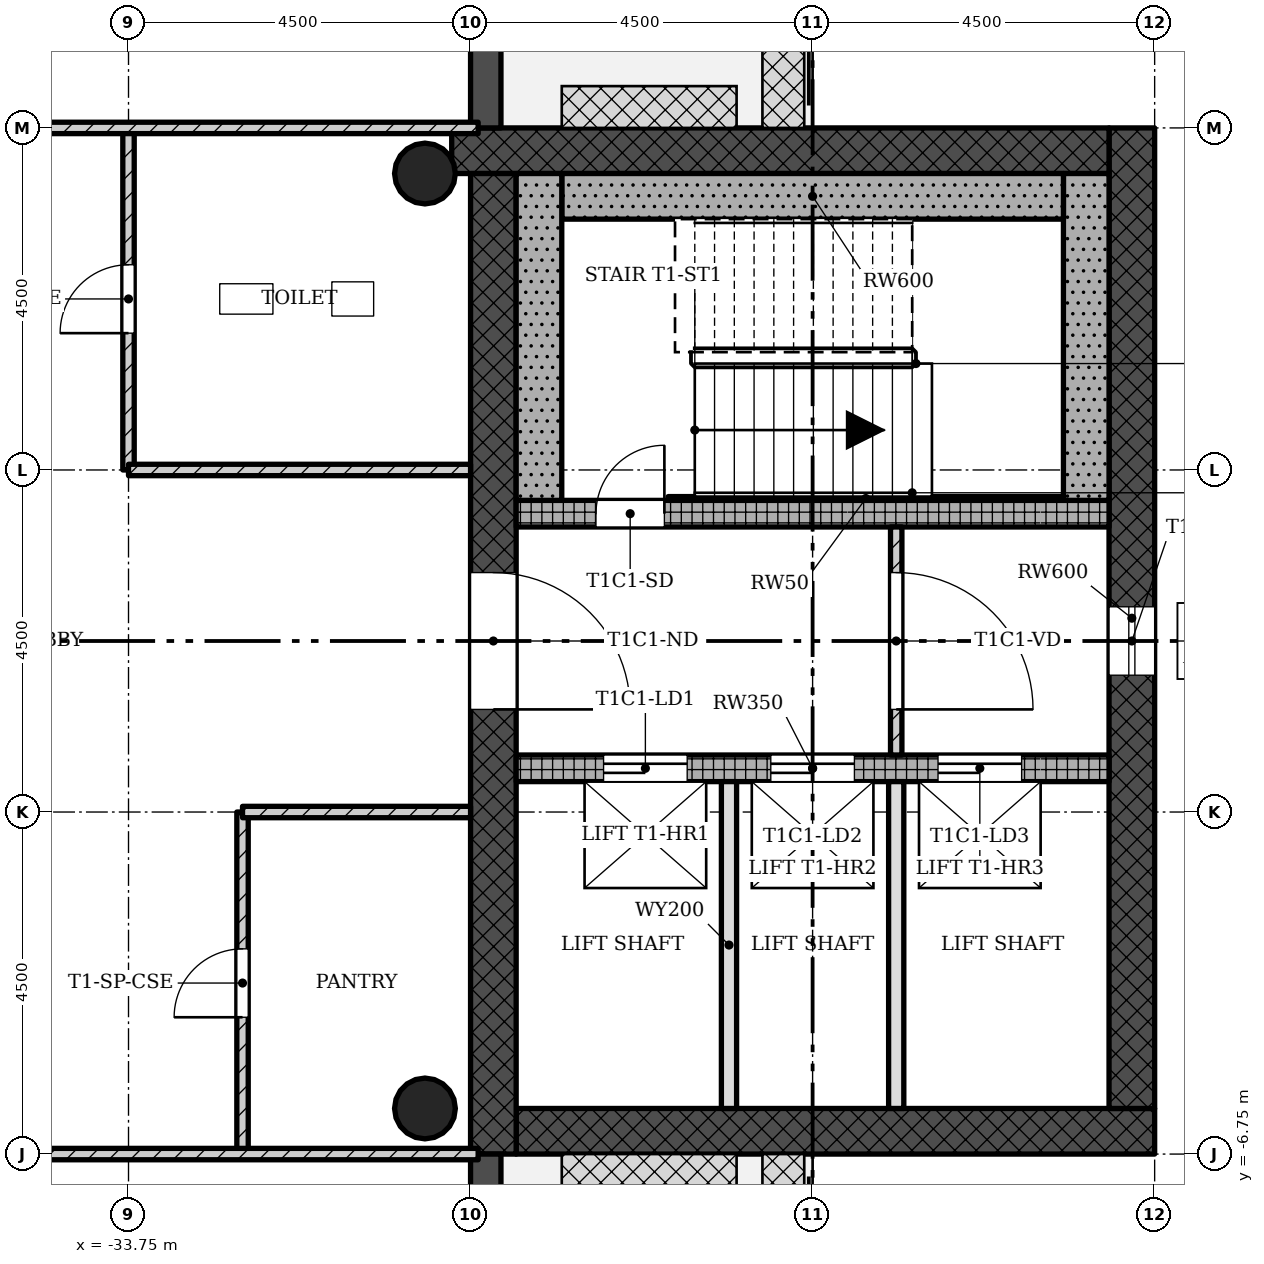
"""IFC4 building model, lengths in metres.
Left out: names, types, materials, properties, quantities, classifications, styles, units other than length and angle.
Written with IfcOpenShell. Run it as: python <this file> out.ifc"""

import sys

from ifc_helpers import new_model, si_unit, direction, frame, frame_2d, origin, origin_2d, place, context, subcontext, project, spatial, rectangle, hollow_circle, extrude, element, fill, save


model = new_model("IFC4")
c1 = context("Model", 3, precision=1e-05, world=origin(), true_north=direction((0.0, 1.0)))
c2 = subcontext(c1, "Body", "Model", "MODEL_VIEW")
j1 = project(units=[si_unit("LENGTHUNIT", "METRE"), si_unit("PLANEANGLEUNIT", "RADIAN")], contexts=[c1])
p1 = place(None, origin())
s1 = spatial("IfcSite", under=j1, at=p1, CompositionType="ELEMENT")
p2 = place(p1, origin())
s2 = spatial("IfcBuilding", under=s1, at=p2, CompositionType="ELEMENT")
p3 = place(p2, frame((0.0, 0.0, 237.9)))
s3 = spatial("IfcBuildingStorey", under=s2, at=p3, CompositionType="ELEMENT", Elevation=237.9)
p4 = place(p3, frame((-28.65, -6.45, 0.0), z_axis=(0.0, 0.0, 1.0), x_axis=(1.0, 0.0, 0.0)))
e1 = element("IfcWall", 1, at=p4, inside=s3, PredefinedType="SHEAR", context=c2, shape_type="SweptSolid", body=[
    extrude(rectangle(XDim=8.4, YDim=0.6, at=frame_2d((4.2, 0.0))), origin(), (0.0, 0.0, 1.0), 4.5),
])
p5 = place(p3, frame((-20.55, -6.15, 0.0), z_axis=(0.0, 0.0, 1.0), x_axis=(0.0, 1.0, 0.0)))
e2 = element("IfcWall", 2, at=p5, inside=s3, PredefinedType="SHEAR", context=c2, shape_type="SweptSolid", body=[
    extrude(rectangle(XDim=12.9, YDim=0.6, at=frame_2d((6.45, 0.0))), origin(), (0.0, 0.0, 1.0), 4.5),
])
p6 = place(p5, frame((5.7, 0.0, 0.45)))
e3 = element("IfcOpeningElement", 3, at=p6, cuts=e2, PredefinedType="OPENING", context=c2, shape_type="SweptSolid", body=[
    extrude(rectangle(XDim=0.9, YDim=2.4, at=frame_2d((0.45, 1.2))), frame((0.0, 0.31, 0.0), z_axis=(0.0, -1.0, 0.0), x_axis=(1.0, 0.0, 0.0)), (0.0, 0.0, 1.0), 0.62),
])
p7 = place(p3, frame((-20.85, 6.45, 0.0), z_axis=(0.0, 0.0, 1.0), x_axis=(-1.0, 0.0, 0.0)))
e4 = element("IfcWall", 4, at=p7, inside=s3, PredefinedType="SHEAR", context=c2, shape_type="SweptSolid", body=[
    extrude(rectangle(XDim=8.648, YDim=0.6, at=frame_2d((4.324, 0.0))), origin(), (0.0, 0.0, 1.0), 4.5),
])
p8 = place(p3, frame((-28.95, 6.15, 0.0), z_axis=(0.0, 0.0, 1.0), x_axis=(0.0, -1.0, 0.0)))
e5 = element("IfcWall", 5, at=p8, inside=s3, PredefinedType="SHEAR", context=c2, shape_type="SweptSolid", body=[
    extrude(rectangle(XDim=12.9, YDim=0.6, at=frame_2d((6.45, 0.0))), origin(), (0.0, 0.0, 1.0), 4.5),
])
p9 = place(p8, frame((5.25, 0.0, 0.0)))
e6 = element("IfcOpeningElement", 6, at=p9, cuts=e5, PredefinedType="OPENING", context=c2, shape_type="SweptSolid", body=[
    extrude(rectangle(XDim=1.8, YDim=2.1, at=frame_2d((0.9, 1.05))), frame((0.0, 0.31, 0.0), z_axis=(0.0, -1.0, 0.0), x_axis=(1.0, 0.0, 0.0)), (0.0, 0.0, 1.0), 0.62),
])
p10 = place(p3, frame((-28.65, -1.675, 0.0), z_axis=(0.0, 0.0, 1.0), x_axis=(1.0, 0.0, 0.0)))
e7 = element("IfcWall", 7, at=p10, inside=s3, PredefinedType="SHEAR", context=c2, shape_type="SweptSolid", body=[
    extrude(rectangle(XDim=7.8, YDim=0.35, at=frame_2d((3.9, 0.0))), origin(), (0.0, 0.0, 1.0), 4.5),
])
p11 = place(p10, frame((1.15, 0.0, 0.0)))
e8 = element("IfcOpeningElement", 8, at=p11, cuts=e7, PredefinedType="OPENING", context=c2, shape_type="SweptSolid", body=[
    extrude(rectangle(XDim=1.1, YDim=2.1, at=frame_2d((0.55, 1.05))), frame((0.0, 0.185, 0.0), z_axis=(0.0, -1.0, 0.0), x_axis=(1.0, 0.0, 0.0)), (0.0, 0.0, 1.0), 0.37),
])
p12 = place(p10, frame((3.35, 0.0, 0.0)))
e9 = element("IfcOpeningElement", 9, at=p12, cuts=e7, PredefinedType="OPENING", context=c2, shape_type="SweptSolid", body=[
    extrude(rectangle(XDim=1.1, YDim=2.1, at=frame_2d((0.55, 1.05))), frame((0.0, 0.185, 0.0), z_axis=(0.0, -1.0, 0.0), x_axis=(1.0, 0.0, 0.0)), (0.0, 0.0, 1.0), 0.37),
])
p13 = place(p10, frame((5.55, 0.0, 0.0)))
e10 = element("IfcOpeningElement", 10, at=p13, cuts=e7, PredefinedType="OPENING", context=c2, shape_type="SweptSolid", body=[
    extrude(rectangle(XDim=1.1, YDim=2.1, at=frame_2d((0.55, 1.05))), frame((0.0, 0.185, 0.0), z_axis=(0.0, -1.0, 0.0), x_axis=(1.0, 0.0, 0.0)), (0.0, 0.0, 1.0), 0.37),
])
p14 = place(p3, frame((-28.65, 1.675, 0.0), z_axis=(0.0, 0.0, 1.0), x_axis=(1.0, 0.0, 0.0)))
e11 = element("IfcWall", 11, at=p14, inside=s3, PredefinedType="SHEAR", context=c2, shape_type="SweptSolid", body=[
    extrude(rectangle(XDim=7.8, YDim=0.35, at=frame_2d((3.9, 0.0))), origin(), (0.0, 0.0, 1.0), 4.5),
])
p15 = place(p14, frame((1.05, 0.0, 0.0)))
e12 = element("IfcOpeningElement", 12, at=p15, cuts=e11, PredefinedType="OPENING", context=c2, shape_type="SweptSolid", body=[
    extrude(rectangle(XDim=0.9, YDim=2.1, at=frame_2d((0.45, 1.05))), frame((0.0, 0.185, 0.0), z_axis=(0.0, -1.0, 0.0), x_axis=(1.0, 0.0, 0.0)), (0.0, 0.0, 1.0), 0.37),
])
for number, where, z_axis, x_axis in (
    (13, (-29.85, -6.15, 0.0), (0.0, 0.0, 1.0), (1.0, 0.0, 0.0)),
    (14, (-29.85, 6.15, 0.0), (0.0, 0.0, 1.0), (1.0, 0.0, 0.0)),
):
    element("IfcColumn", number, at=place(p3, frame(where, z_axis=z_axis, x_axis=x_axis)), inside=s3, PredefinedType="COLUMN", context=c2, shape_type="SweptSolid", body=[
        extrude(hollow_circle(Radius=0.4, WallThickness=0.028, at=origin_2d()), origin(), (0.0, 0.0, 1.0), 4.5),
    ])
p16 = place(p3, frame((-29.05, -11.25, -0.02), z_axis=(0.0, 0.0, 1.0), x_axis=(0.0, 1.0, 0.0)))
e15 = element("IfcWall", 15, at=p16, inside=s3, PredefinedType="STANDARD", context=c2, shape_type="SweptSolid", body=[
    extrude(rectangle(XDim=4.5, YDim=0.4, at=frame_2d((2.25, 0.0))), origin(), (0.0, 0.0, 1.0), 4.22),
])
p17 = place(p16, frame((1.35, 0.0, 0.02)))
e16 = element("IfcOpeningElement", 16, at=p17, cuts=e15, PredefinedType="OPENING", context=c2, shape_type="SweptSolid", body=[
    extrude(rectangle(XDim=1.8, YDim=2.1, at=frame_2d((0.9, 1.05))), frame((0.0, 0.21, 0.0), z_axis=(0.0, -1.0, 0.0), x_axis=(1.0, 0.0, 0.0)), (0.0, 0.0, 1.0), 0.42),
])
p18 = place(p3, frame((-29.05, 6.75, -0.02), z_axis=(0.0, 0.0, 1.0), x_axis=(0.0, 1.0, 0.0)))
e17 = element("IfcWall", 17, at=p18, inside=s3, PredefinedType="STANDARD", context=c2, shape_type="SweptSolid", body=[
    extrude(rectangle(XDim=4.5, YDim=0.4, at=frame_2d((2.25, 0.0))), origin(), (0.0, 0.0, 1.0), 4.22),
])
p19 = place(p18, frame((1.35, 0.0, 0.02)))
e18 = element("IfcOpeningElement", 18, at=p19, cuts=e17, PredefinedType="OPENING", context=c2, shape_type="SweptSolid", body=[
    extrude(rectangle(XDim=1.8, YDim=2.1, at=frame_2d((0.9, 1.05))), frame((0.0, 0.21, 0.0), z_axis=(0.0, -1.0, 0.0), x_axis=(1.0, 0.0, 0.0)), (0.0, 0.0, 1.0), 0.42),
])
p20 = place(p3, frame((-23.65, -1.5, 0.0), z_axis=(0.0, 0.0, 1.0), x_axis=(0.0, 1.0, 0.0)))
e19 = element("IfcWall", 19, at=p20, inside=s3, PredefinedType="PARTITIONING", context=c2, shape_type="SweptSolid", body=[
    extrude(rectangle(XDim=3.0, YDim=0.15, at=frame_2d((1.5, 0.0))), origin(), (0.0, 0.0, 1.0), 4.1),
])
p21 = place(p20, frame((0.6, 0.0, 0.0)))
e20 = element("IfcOpeningElement", 20, at=p21, cuts=e19, PredefinedType="OPENING", context=c2, shape_type="SweptSolid", body=[
    extrude(rectangle(XDim=1.8, YDim=2.1, at=frame_2d((0.9, 1.05))), frame((0.0, 0.085, 0.0), z_axis=(0.0, -1.0, 0.0), x_axis=(1.0, 0.0, 0.0)), (0.0, 0.0, 1.0), 0.17),
])
for number, where, z_axis, x_axis in (
    (21, (-25.85, -6.15, 0.0), (0.0, 0.0, 1.0), (0.0, 1.0, 0.0)),
    (22, (-23.65, -6.15, 0.0), (0.0, 0.0, 1.0), (0.0, 1.0, 0.0)),
):
    element("IfcWall", number, at=place(p3, frame(where, z_axis=z_axis, x_axis=x_axis)), inside=s3, PredefinedType="SOLIDWALL", context=c2, shape_type="SweptSolid", body=[
        extrude(rectangle(XDim=4.3, YDim=0.2, at=frame_2d((2.15, 0.0))), origin(), (0.0, 0.0, 1.0), 4.1),
    ])
p22 = place(p3, frame((-33.75, 2.25, 0.0), z_axis=(0.0, 0.0, 1.0), x_axis=(0.0, 1.0, 0.0)))
e23 = element("IfcWall", 23, at=p22, inside=s3, PredefinedType="PARTITIONING", context=c2, shape_type="SweptSolid", body=[
    extrude(rectangle(XDim=4.5, YDim=0.15, at=frame_2d((2.25, 0.0))), origin(), (0.0, 0.0, 1.0), 4.1),
])
p23 = place(p22, frame((1.8, 0.0, 0.0)))
e24 = element("IfcOpeningElement", 24, at=p23, cuts=e23, PredefinedType="OPENING", context=c2, shape_type="SweptSolid", body=[
    extrude(rectangle(XDim=0.9, YDim=2.1, at=frame_2d((0.45, 1.05))), frame((0.0, 0.085, 0.0), z_axis=(0.0, -1.0, 0.0), x_axis=(1.0, 0.0, 0.0)), (0.0, 0.0, 1.0), 0.17),
])
p24 = place(p3, frame((-33.75, 2.25, 0.0), z_axis=(0.0, 0.0, 1.0), x_axis=(1.0, 0.0, 0.0)))
e25 = element("IfcWall", 25, at=p24, inside=s3, PredefinedType="PARTITIONING", context=c2, shape_type="SweptSolid", body=[
    extrude(rectangle(XDim=4.5, YDim=0.15, at=frame_2d((2.25, 0.0))), origin(), (0.0, 0.0, 1.0), 4.1),
])
p25 = place(p3, frame((-32.25, -6.75, 0.0), z_axis=(0.0, 0.0, 1.0), x_axis=(0.0, 1.0, 0.0)))
e26 = element("IfcWall", 26, at=p25, inside=s3, PredefinedType="PARTITIONING", context=c2, shape_type="SweptSolid", body=[
    extrude(rectangle(XDim=4.5, YDim=0.15, at=frame_2d((2.25, 0.0))), origin(), (0.0, 0.0, 1.0), 4.1),
])
p26 = place(p25, frame((1.8, 0.0, 0.0)))
e27 = element("IfcOpeningElement", 27, at=p26, cuts=e26, PredefinedType="OPENING", context=c2, shape_type="SweptSolid", body=[
    extrude(rectangle(XDim=0.9, YDim=2.1, at=frame_2d((0.45, 1.05))), frame((0.0, 0.085, 0.0), z_axis=(0.0, -1.0, 0.0), x_axis=(1.0, 0.0, 0.0)), (0.0, 0.0, 1.0), 0.17),
])
p27 = place(p3, frame((-32.25, -2.25, 0.0), z_axis=(0.0, 0.0, 1.0), x_axis=(1.0, 0.0, 0.0)))
e28 = element("IfcWall", 28, at=p27, inside=s3, PredefinedType="PARTITIONING", context=c2, shape_type="SweptSolid", body=[
    extrude(rectangle(XDim=3.0, YDim=0.15, at=frame_2d((1.5, 0.0))), origin(), (0.0, 0.0, 1.0), 4.1),
])
p28 = place(p3, frame((-42.85, 6.75, 0.0), z_axis=(0.0, 0.0, 1.0), x_axis=(1.0, 0.0, 0.0)))
e29 = element("IfcWall", 29, at=p28, inside=s3, PredefinedType="PARTITIONING", context=c2, shape_type="SweptSolid", body=[
    extrude(rectangle(XDim=13.7, YDim=0.15, at=frame_2d((6.85, 0.0))), origin(), (0.0, 0.0, 1.0), 4.1),
])
p29 = place(p28, frame((5.95, 0.0, 0.0)))
e30 = element("IfcOpeningElement", 30, at=p29, cuts=e29, PredefinedType="OPENING", context=c2, shape_type="SweptSolid", body=[
    extrude(rectangle(XDim=1.8, YDim=2.1, at=frame_2d((0.9, 1.05))), frame((0.0, 0.085, 0.0), z_axis=(0.0, -1.0, 0.0), x_axis=(1.0, 0.0, 0.0)), (0.0, 0.0, 1.0), 0.17),
])
p30 = place(p3, frame((-42.85, -6.75, 0.0), z_axis=(0.0, 0.0, 1.0), x_axis=(1.0, 0.0, 0.0)))
e31 = element("IfcWall", 31, at=p30, inside=s3, PredefinedType="PARTITIONING", context=c2, shape_type="SweptSolid", body=[
    extrude(rectangle(XDim=13.7, YDim=0.15, at=frame_2d((6.85, 0.0))), origin(), (0.0, 0.0, 1.0), 4.1),
])
p31 = place(p30, frame((5.95, 0.0, 0.0)))
e32 = element("IfcOpeningElement", 32, at=p31, cuts=e31, PredefinedType="OPENING", context=c2, shape_type="SweptSolid", body=[
    extrude(rectangle(XDim=1.8, YDim=2.1, at=frame_2d((0.9, 1.05))), frame((0.0, 0.085, 0.0), z_axis=(0.0, -1.0, 0.0), x_axis=(1.0, 0.0, 0.0)), (0.0, 0.0, 1.0), 0.17),
])
p32 = place(p3, frame((-21.15, 1.85, 0.0), z_axis=(0.0, 0.0, 1.0), x_axis=(0.0, 1.0, 0.0)))
e33 = element("IfcWall", 33, at=p32, inside=s3, PredefinedType="SHEAR", context=c2, shape_type="SweptSolid", body=[
    extrude(rectangle(XDim=4.3, YDim=0.6, at=frame_2d((2.15, 0.0))), origin(), (0.0, 0.0, 1.0), 4.5),
])
p33 = place(p3, frame((-28.05, 5.85, 0.0), z_axis=(0.0, 0.0, 1.0), x_axis=(1.0, 0.0, 0.0)))
e34 = element("IfcWall", 34, at=p33, inside=s3, PredefinedType="SHEAR", context=c2, shape_type="SweptSolid", body=[
    extrude(rectangle(XDim=6.6, YDim=0.6, at=frame_2d((3.3, 0.0))), origin(), (0.0, 0.0, 1.0), 4.5),
])
p34 = place(p3, frame((-28.35, 1.85, 0.0), z_axis=(0.0, 0.0, 1.0), x_axis=(0.0, 1.0, 0.0)))
e35 = element("IfcWall", 35, at=p34, inside=s3, PredefinedType="SHEAR", context=c2, shape_type="SweptSolid", body=[
    extrude(rectangle(XDim=4.3, YDim=0.6, at=frame_2d((2.15, 0.0))), origin(), (0.0, 0.0, 1.0), 4.5),
])
p35 = place(p3, frame((-26.65, 1.875, 0.0), z_axis=(0.0, 0.0, 1.0), x_axis=(1.0, 0.0, 0.0)))
e36 = element("IfcWall", 36, at=p35, inside=s3, PredefinedType="SHEAR", context=c2, shape_type="SweptSolid", body=[
    extrude(rectangle(XDim=5.2, YDim=0.05, at=frame_2d((2.6, 0.0))), origin(), (0.0, 0.0, 1.0), 4.5),
])
p36 = place(p6, origin())
e37 = element("IfcWindow", 37, at=p36, inside=s3, PartitioningType="SINGLE_PANEL", PredefinedType="WINDOW", context=c2, shape_type="SweptSolid", body=[
    extrude(rectangle(XDim=0.9, YDim=2.4, at=frame_2d((0.45, 1.2))), frame((0.0, 0.03, 0.0), z_axis=(0.0, -1.0, 0.0), x_axis=(1.0, 0.0, 0.0)), (0.0, 0.0, 1.0), 0.06),
])
fill(e3, e37)
p37 = place(p21, origin())
e38 = element("IfcDoor", 38, at=p37, inside=s3, OperationType="SINGLE_SWING_LEFT", PredefinedType="DOOR", context=c2, shape_type="SweptSolid", body=[
    extrude(rectangle(XDim=1.8, YDim=2.1, at=frame_2d((0.9, 1.05))), frame((0.0, 0.025, 0.0), z_axis=(0.0, -1.0, 0.0), x_axis=(1.0, 0.0, 0.0)), (0.0, 0.0, 1.0), 0.05),
])
fill(e20, e38)
p38 = place(p23, origin())
e39 = element("IfcDoor", 39, at=p38, inside=s3, OperationType="SINGLE_SWING_RIGHT", PredefinedType="DOOR", context=c2, shape_type="SweptSolid", body=[
    extrude(rectangle(XDim=0.9, YDim=2.1, at=frame_2d((0.45, 1.05))), frame((0.0, 0.025, 0.0), z_axis=(0.0, -1.0, 0.0), x_axis=(1.0, 0.0, 0.0)), (0.0, 0.0, 1.0), 0.05),
])
fill(e24, e39)
p39 = place(p26, origin())
e40 = element("IfcDoor", 40, at=p39, inside=s3, OperationType="SINGLE_SWING_RIGHT", PredefinedType="DOOR", context=c2, shape_type="SweptSolid", body=[
    extrude(rectangle(XDim=0.9, YDim=2.1, at=frame_2d((0.45, 1.05))), frame((0.0, 0.025, 0.0), z_axis=(0.0, -1.0, 0.0), x_axis=(1.0, 0.0, 0.0)), (0.0, 0.0, 1.0), 0.05),
])
fill(e27, e40)
p40 = place(p15, origin())
e41 = element("IfcDoor", 41, at=p40, inside=s3, OperationType="SINGLE_SWING_LEFT", PredefinedType="DOOR", context=c2, shape_type="SweptSolid", body=[
    extrude(rectangle(XDim=0.9, YDim=2.1, at=frame_2d((0.45, 1.05))), frame((0.0, 0.025, 0.0), z_axis=(0.0, -1.0, 0.0), x_axis=(1.0, 0.0, 0.0)), (0.0, 0.0, 1.0), 0.05),
])
fill(e12, e41)
p41 = place(p11, origin())
e42 = element("IfcDoor", 42, at=p41, inside=s3, OperationType="SLIDING_TO_LEFT", PredefinedType="DOOR", context=c2, shape_type="SweptSolid", body=[
    extrude(rectangle(XDim=1.1, YDim=2.1, at=frame_2d((0.55, 1.05))), frame((0.0, 0.025, 0.0), z_axis=(0.0, -1.0, 0.0), x_axis=(1.0, 0.0, 0.0)), (0.0, 0.0, 1.0), 0.05),
])
fill(e8, e42)
p42 = place(p12, origin())
e43 = element("IfcDoor", 43, at=p42, inside=s3, OperationType="SLIDING_TO_LEFT", PredefinedType="DOOR", context=c2, shape_type="SweptSolid", body=[
    extrude(rectangle(XDim=1.1, YDim=2.1, at=frame_2d((0.55, 1.05))), frame((0.0, 0.025, 0.0), z_axis=(0.0, -1.0, 0.0), x_axis=(1.0, 0.0, 0.0)), (0.0, 0.0, 1.0), 0.05),
])
fill(e9, e43)
p43 = place(p13, origin())
e44 = element("IfcDoor", 44, at=p43, inside=s3, OperationType="SLIDING_TO_LEFT", PredefinedType="DOOR", context=c2, shape_type="SweptSolid", body=[
    extrude(rectangle(XDim=1.1, YDim=2.1, at=frame_2d((0.55, 1.05))), frame((0.0, 0.025, 0.0), z_axis=(0.0, -1.0, 0.0), x_axis=(1.0, 0.0, 0.0)), (0.0, 0.0, 1.0), 0.05),
])
fill(e10, e44)
p44 = place(p9, origin())
e45 = element("IfcDoor", 45, at=p44, inside=s3, OperationType="SINGLE_SWING_LEFT", PredefinedType="DOOR", context=c2, shape_type="SweptSolid", body=[
    extrude(rectangle(XDim=1.8, YDim=2.1, at=frame_2d((0.9, 1.05))), frame((0.0, 0.025, 0.0), z_axis=(0.0, -1.0, 0.0), x_axis=(1.0, 0.0, 0.0)), (0.0, 0.0, 1.0), 0.05),
])
fill(e6, e45)
save(model, sys.argv[1])
